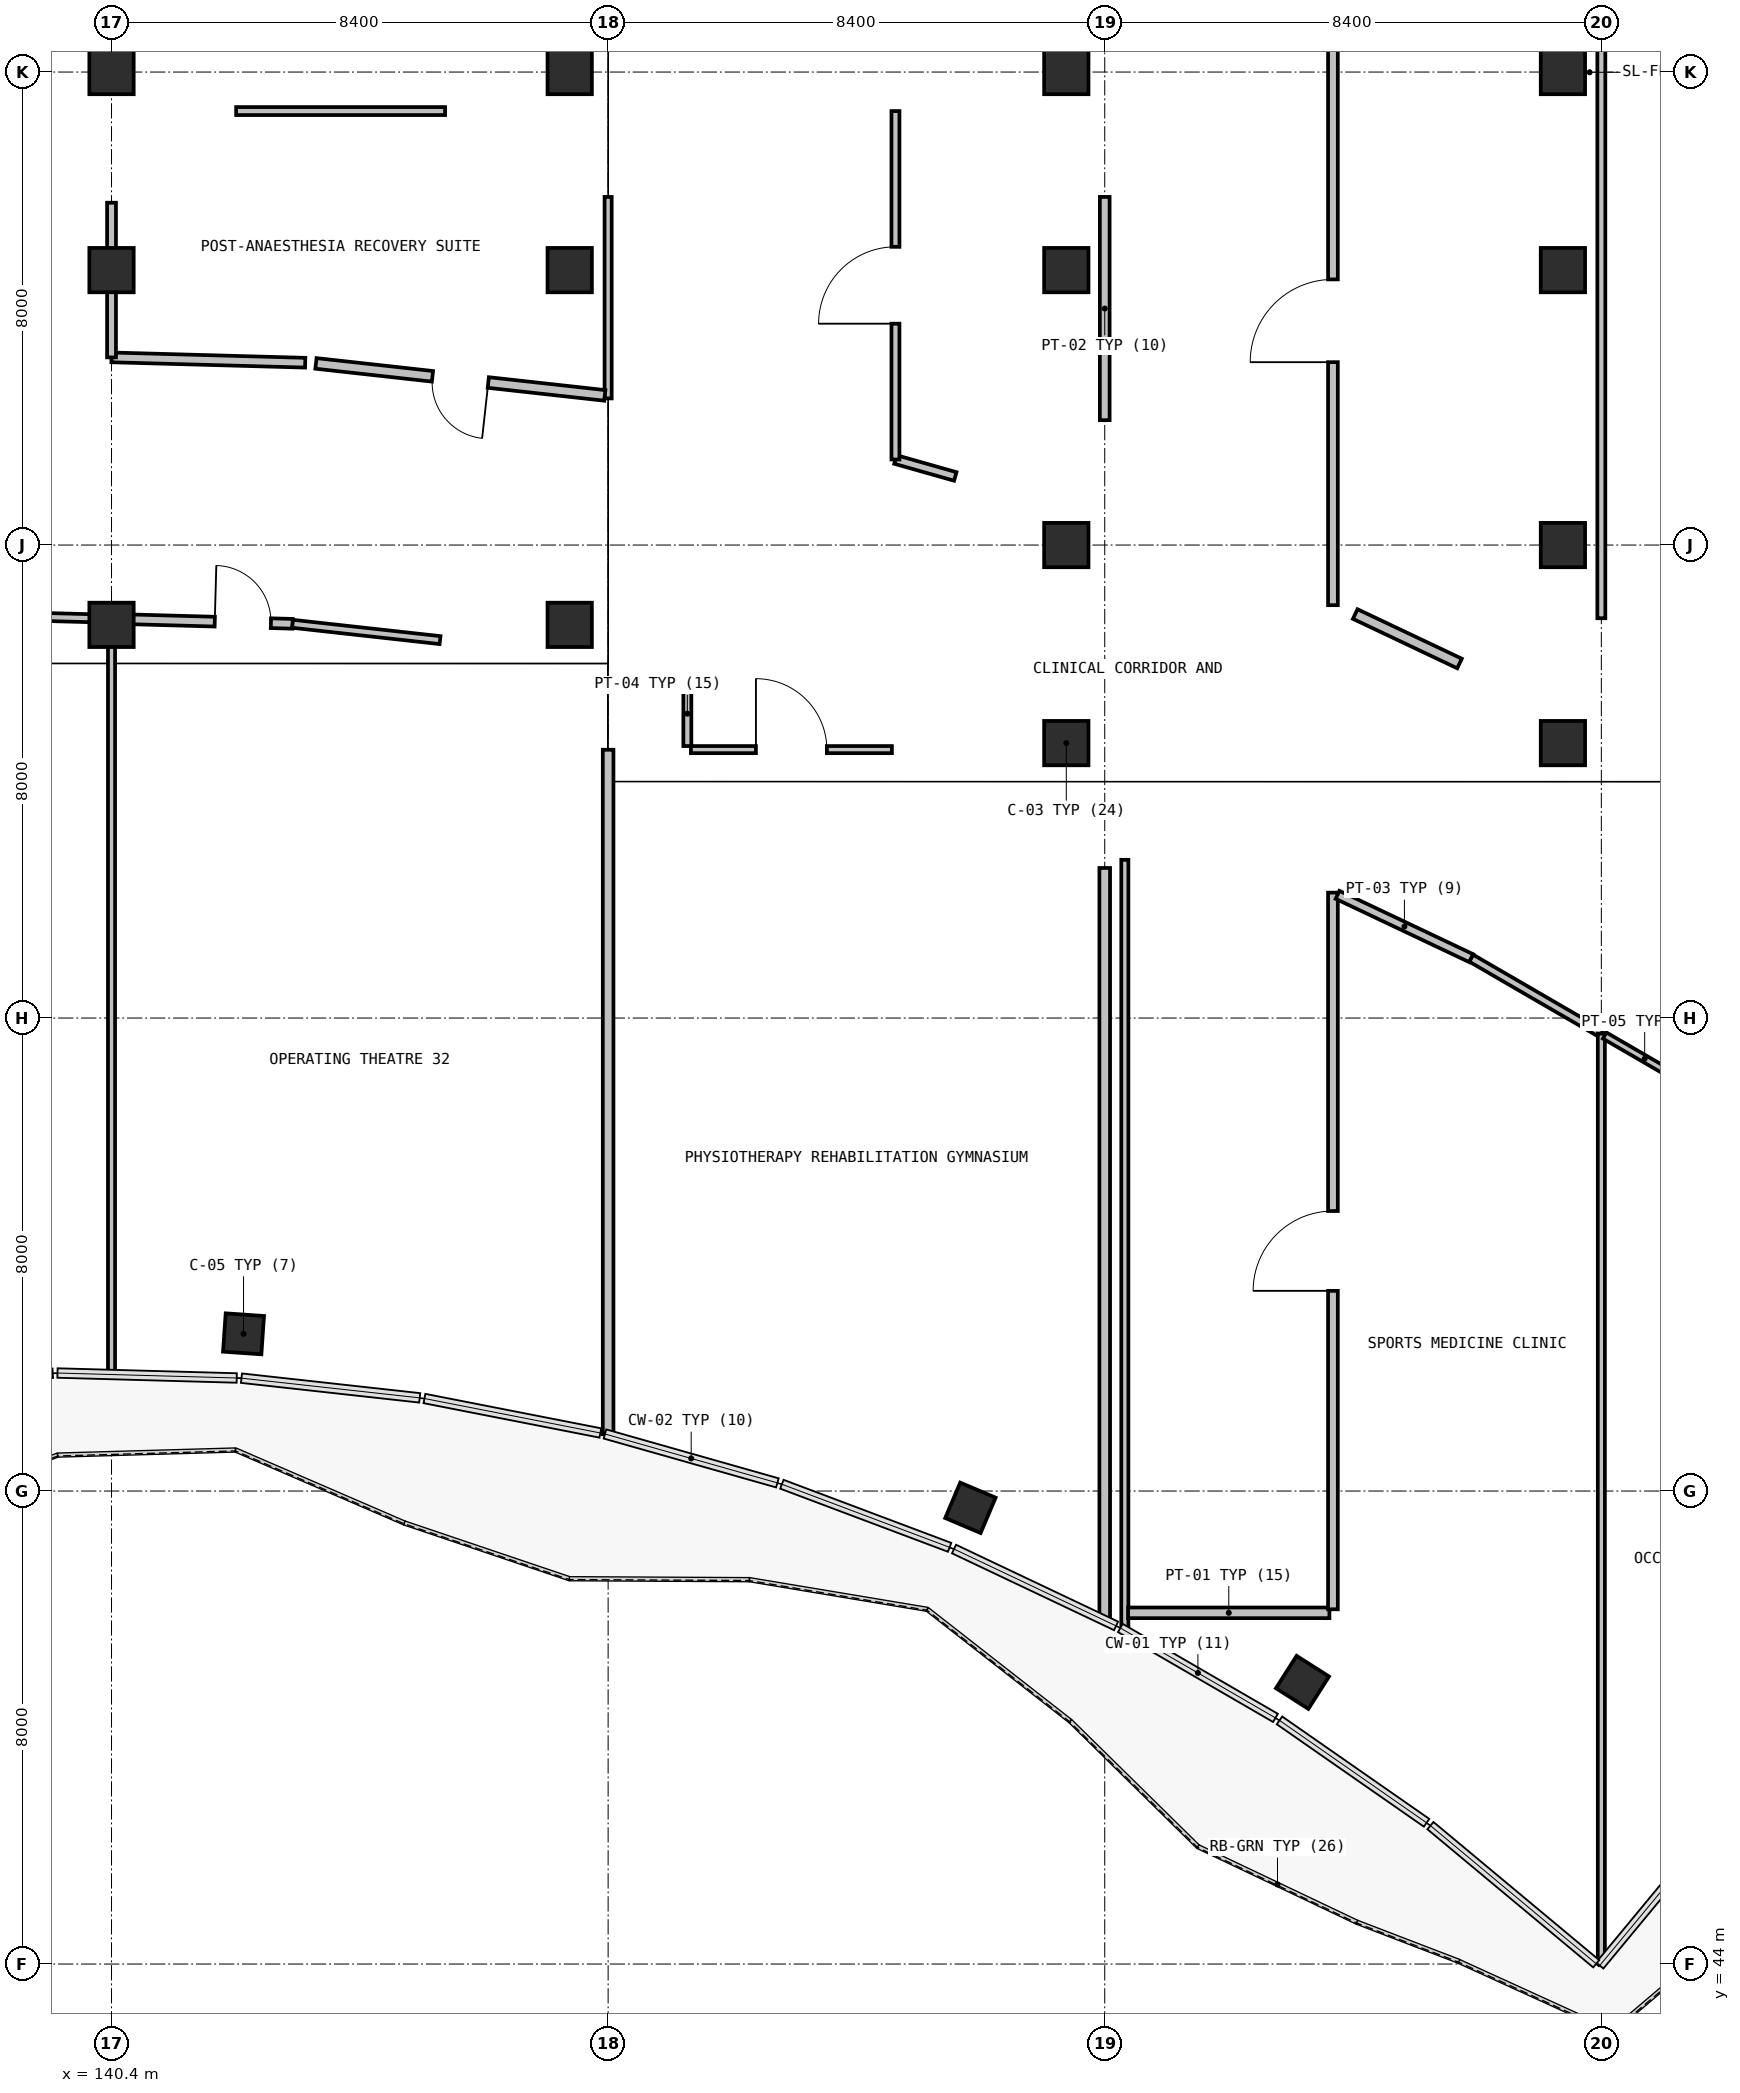
"""IFC4 building model, lengths in metres.
Left out: names, types, materials, properties, quantities, classifications, styles, units other than length and angle.
Written with IfcOpenShell. Run it as: python <this file> out.ifc"""

import sys

from ifc_helpers import new_model, si_unit, direction, frame, frame_2d, origin, origin_2d, place, context, subcontext, project, spatial, rectangle, extrude, element, fill, save


model = new_model("IFC4")
c1 = context("Model", 3, precision=1e-05, world=origin(), true_north=direction((0.0, 1.0)))
c2 = subcontext(c1, "Body", "Model", "MODEL_VIEW")
j1 = project(units=[si_unit("LENGTHUNIT", "METRE"), si_unit("PLANEANGLEUNIT", "RADIAN")], contexts=[c1])
p1 = place(None, origin())
s1 = spatial("IfcSite", under=j1, at=p1, CompositionType="ELEMENT")
p2 = place(p1, origin())
s2 = spatial("IfcBuilding", under=s1, at=p2, CompositionType="ELEMENT")
p3 = place(p2, frame((0.0, 0.0, 10.2)))
s3 = spatial("IfcBuildingStorey", under=s2, at=p3, CompositionType="ELEMENT", Elevation=10.2)
for number, where, z_axis, x_axis in (
    (1, (140.4, 66.65, 0.0), (0.0, 0.0, 1.0), (1.0, 0.0, 0.0)),
    (2, (140.4, 72.65, 0.0), (0.0, 0.0, 1.0), (1.0, 0.0, 0.0)),
    (3, (140.4, 76.0, 0.0), (0.0, 0.0, 1.0), (1.0, 0.0, 0.0)),
    (4, (148.15, 66.65, 0.0), (0.0, 0.0, 1.0), (1.0, 0.0, 0.0)),
    (5, (148.15, 72.65, 0.0), (0.0, 0.0, 1.0), (1.0, 0.0, 0.0)),
    (6, (148.15, 76.0, 0.0), (0.0, 0.0, 1.0), (1.0, 0.0, 0.0)),
    (7, (156.55, 64.65, 0.0), (0.0, 0.0, 1.0), (1.0, 0.0, 0.0)),
    (8, (156.55, 68.0, 0.0), (0.0, 0.0, 1.0), (1.0, 0.0, 0.0)),
    (9, (156.55, 72.65, 0.0), (0.0, 0.0, 1.0), (1.0, 0.0, 0.0)),
    (10, (156.55, 76.0, 0.0), (0.0, 0.0, 1.0), (1.0, 0.0, 0.0)),
    (11, (164.95, 64.65, 0.0), (0.0, 0.0, 1.0), (1.0, 0.0, 0.0)),
    (12, (164.95, 68.0, 0.0), (0.0, 0.0, 1.0), (1.0, 0.0, 0.0)),
    (13, (164.95, 72.65, 0.0), (0.0, 0.0, 1.0), (1.0, 0.0, 0.0)),
    (14, (164.95, 76.0, 0.0), (0.0, 0.0, 1.0), (1.0, 0.0, 0.0)),
):
    element("IfcColumn", number, at=place(p3, frame(where, z_axis=z_axis, x_axis=x_axis)), inside=s3, PredefinedType="COLUMN", context=c2, shape_type="SweptSolid", body=[
        extrude(rectangle(XDim=0.75, YDim=0.75, at=origin_2d()), origin(), (0.0, 0.0, 1.0), 4.8),
    ])
for number, where, z_axis, x_axis in (
    (15, (142.633, 54.659, 0.0), (0.0, 0.0, 1.0), (0.069, 0.998, 0.0)),
    (16, (154.928, 51.716, 0.0), (0.0, 0.0, 1.0), (0.39, 0.921, 0.0)),
    (17, (160.545, 48.764, 0.0), (0.0, 0.0, 1.0), (0.537, 0.844, 0.0)),
):
    element("IfcColumn", number, at=place(p3, frame(where, z_axis=z_axis, x_axis=x_axis)), inside=s3, PredefinedType="COLUMN", context=c2, shape_type="SweptSolid", body=[
        extrude(rectangle(XDim=0.65, YDim=0.65, at=origin_2d()), origin(), (0.0, 0.0, 1.0), 4.8),
    ])
p4 = place(p3, frame((139.29, 66.783, 0.0), z_axis=(0.0, 0.0, 1.0), x_axis=(0.999634166902, -0.027046854934, 0.0)))
e18 = element("IfcWall", 18, at=p4, inside=s3, PredefinedType="PARTITIONING", context=c2, shape_type="SweptSolid", body=[
    extrude(rectangle(XDim=1.11, YDim=0.135, at=frame_2d((0.555, 0.0))), origin(), (0.0, 0.0, 1.0), 3.71),
])
p5 = place(p3, frame((140.4, 66.753, 0.0), z_axis=(0.0, 0.0, 1.0), x_axis=(0.0, -1.0, 0.0)))
e19 = element("IfcWall", 19, at=p5, inside=s3, PredefinedType="PARTITIONING", context=c2, shape_type="SweptSolid", body=[
    extrude(rectangle(XDim=12.771, YDim=0.12, at=frame_2d((6.385, 0.0))), origin(), (0.0, 0.0, 1.0), 4.46),
])
p6 = place(p3, frame((140.456, 66.751, 0.0), z_axis=(0.0, 0.0, 1.0), x_axis=(0.999619161953, -0.027595852149, 0.0)))
e20 = element("IfcWall", 20, at=p6, inside=s3, PredefinedType="PARTITIONING", context=c2, shape_type="SweptSolid", body=[
    extrude(rectangle(XDim=3.008, YDim=0.165, at=frame_2d((1.504, 0.0))), origin(), (0.0, 0.0, 1.0), 3.71),
])
p7 = place(p6, frame((1.691, 0.0, 0.0)))
e21 = element("IfcOpeningElement", 21, at=p7, cuts=e20, PredefinedType="OPENING", context=c2, shape_type="SweptSolid", body=[
    extrude(rectangle(XDim=0.95, YDim=2.1, at=frame_2d((0.475, 1.05))), frame((0.0, 0.093, 0.0), z_axis=(0.0, -1.0, 0.0), x_axis=(1.0, 0.0, 0.0)), (0.0, 0.0, 1.0), 0.185),
])
p8 = place(p3, frame((143.463, 66.668, 0.0), z_axis=(0.0, 0.0, 1.0), x_axis=(0.993938191899, -0.109940305095, 0.0)))
e22 = element("IfcWall", 22, at=p8, inside=s3, PredefinedType="PARTITIONING", context=c2, shape_type="SweptSolid", body=[
    extrude(rectangle(XDim=2.509, YDim=0.135, at=frame_2d((1.255, 0.0))), origin(), (0.0, 0.0, 1.0), 3.71),
])
p9 = place(p3, frame((148.8, 64.538, 0.0), z_axis=(0.0, 0.0, 1.0), x_axis=(0.0, -1.0, 0.0)))
e23 = element("IfcWall", 23, at=p9, inside=s3, PredefinedType="PARTITIONING", context=c2, shape_type="SweptSolid", body=[
    extrude(rectangle(XDim=11.577, YDim=0.18, at=frame_2d((5.789, 0.0))), origin(), (0.0, 0.0, 1.0), 4.46),
])
p10 = place(p3, frame((142.508, 75.34, 0.0), z_axis=(0.0, 0.0, 1.0), x_axis=(1.0, 0.0, 0.0)))
e24 = element("IfcWall", 24, at=p10, inside=s3, PredefinedType="PARTITIONING", context=c2, shape_type="SweptSolid", body=[
    extrude(rectangle(XDim=3.534, YDim=0.135, at=frame_2d((1.767, 0.0))), origin(), (0.0, 0.0, 1.0), 4.46),
])
p11 = place(p3, frame((148.8, 73.888, 0.0), z_axis=(0.0, 0.0, 1.0), x_axis=(0.0, -1.0, 0.0)))
e25 = element("IfcWall", 25, at=p11, inside=s3, PredefinedType="PARTITIONING", context=c2, shape_type="SweptSolid", body=[
    extrude(rectangle(XDim=3.408, YDim=0.12, at=frame_2d((1.704, 0.0))), origin(), (0.0, 0.0, 1.0), 4.46),
])
p12 = place(p3, frame((148.744, 70.531, 0.0), z_axis=(0.0, 0.0, 1.0), x_axis=(-0.993925453939, 0.110055404284, 0.0)))
e26 = element("IfcWall", 26, at=p12, inside=s3, PredefinedType="PARTITIONING", context=c2, shape_type="SweptSolid", body=[
    extrude(rectangle(XDim=4.916, YDim=0.18, at=frame_2d((2.458, 0.0))), origin(), (0.0, 0.0, 1.0), 4.46),
])
p13 = place(p12, frame((1.983, 0.0, 0.0)))
e27 = element("IfcOpeningElement", 27, at=p13, cuts=e26, PredefinedType="OPENING", context=c2, shape_type="SweptSolid", body=[
    extrude(rectangle(XDim=0.95, YDim=2.1, at=frame_2d((0.475, 1.05))), frame((0.0, 0.1, 0.0), z_axis=(0.0, -1.0, 0.0), x_axis=(1.0, 0.0, 0.0)), (0.0, 0.0, 1.0), 0.2),
])
p14 = place(p3, frame((143.676, 71.084, 0.0), z_axis=(0.0, 0.0, 1.0), x_axis=(-0.999622135389, 0.02748793263, 0.0)))
e28 = element("IfcWall", 28, at=p14, inside=s3, PredefinedType="PARTITIONING", context=c2, shape_type="SweptSolid", body=[
    extrude(rectangle(XDim=3.277, YDim=0.165, at=frame_2d((1.639, 0.0))), origin(), (0.0, 0.0, 1.0), 4.46),
])
p15 = place(p3, frame((140.4, 71.174, 0.0), z_axis=(0.0, 0.0, 1.0), x_axis=(0.0, 1.0, 0.0)))
e29 = element("IfcWall", 29, at=p15, inside=s3, PredefinedType="PARTITIONING", context=c2, shape_type="SweptSolid", body=[
    extrude(rectangle(XDim=2.616, YDim=0.15, at=frame_2d((1.308, 0.0))), origin(), (0.0, 0.0, 1.0), 3.81),
])
p16 = place(p3, frame((150.14, 65.695, 0.0), z_axis=(0.0, 0.0, 1.0), x_axis=(0.0, -1.0, 0.0)))
e30 = element("IfcWall", 30, at=p16, inside=s3, PredefinedType="PARTITIONING", context=c2, shape_type="SweptSolid", body=[
    extrude(rectangle(XDim=1.095, YDim=0.135, at=frame_2d((0.547, 0.0))), origin(), (0.0, 0.0, 1.0), 4.46),
])
p17 = place(p3, frame((150.2, 64.54, 0.0), z_axis=(0.0, 0.0, 1.0), x_axis=(1.0, 0.0, 0.0)))
e31 = element("IfcWall", 31, at=p17, inside=s3, PredefinedType="PARTITIONING", context=c2, shape_type="SweptSolid", body=[
    extrude(rectangle(XDim=3.4, YDim=0.12, at=frame_2d((1.7, 0.0))), origin(), (0.0, 0.0, 1.0), 4.46),
])
p18 = place(p17, frame((1.1, 0.0, 0.0)))
e32 = element("IfcOpeningElement", 32, at=p18, cuts=e31, PredefinedType="OPENING", context=c2, shape_type="SweptSolid", body=[
    extrude(rectangle(XDim=1.2, YDim=2.15, at=frame_2d((0.6, 1.075))), frame((0.0, 0.07, 0.0), z_axis=(0.0, -1.0, 0.0), x_axis=(1.0, 0.0, 0.0)), (0.0, 0.0, 1.0), 0.14),
])
p19 = place(p3, frame((157.2, 62.538, 0.0), z_axis=(0.0, 0.0, 1.0), x_axis=(0.0, -1.0, 0.0)))
e33 = element("IfcWall", 33, at=p19, inside=s3, PredefinedType="PARTITIONING", context=c2, shape_type="SweptSolid", body=[
    extrude(rectangle(XDim=12.715, YDim=0.18, at=frame_2d((6.357, 0.0))), origin(), (0.0, 0.0, 1.0), 4.46),
])
p20 = place(p3, frame((157.2, 73.888, 0.0), z_axis=(0.0, 0.0, 1.0), x_axis=(0.0, -1.0, 0.0)))
e34 = element("IfcWall", 34, at=p20, inside=s3, PredefinedType="PARTITIONING", context=c2, shape_type="SweptSolid", body=[
    extrude(rectangle(XDim=3.776, YDim=0.165, at=frame_2d((1.888, 0.0))), origin(), (0.0, 0.0, 1.0), 4.46),
])
p21 = place(p3, frame((154.672, 69.16, 0.0), z_axis=(0.0, 0.0, 1.0), x_axis=(-0.962047568244, 0.272881799386, 0.0)))
e35 = element("IfcWall", 35, at=p21, inside=s3, PredefinedType="PARTITIONING", context=c2, shape_type="SweptSolid", body=[
    extrude(rectangle(XDim=1.052, YDim=0.15, at=frame_2d((0.526, 0.0))), origin(), (0.0, 0.0, 1.0), 4.46),
])
p22 = place(p3, frame((153.66, 69.447, 0.0), z_axis=(0.0, 0.0, 1.0), x_axis=(0.0, 1.0, 0.0)))
e36 = element("IfcWall", 36, at=p22, inside=s3, PredefinedType="PARTITIONING", context=c2, shape_type="SweptSolid", body=[
    extrude(rectangle(XDim=5.893, YDim=0.135, at=frame_2d((2.947, 0.0))), origin(), (0.0, 0.0, 1.0), 4.46),
])
p23 = place(p22, frame((2.297, 0.0, 0.0)))
e37 = element("IfcOpeningElement", 37, at=p23, cuts=e36, PredefinedType="OPENING", context=c2, shape_type="SweptSolid", body=[
    extrude(rectangle(XDim=1.3, YDim=2.15, at=frame_2d((0.65, 1.075))), frame((0.0, 0.077, 0.0), z_axis=(0.0, -1.0, 0.0), x_axis=(1.0, 0.0, 0.0)), (0.0, 0.0, 1.0), 0.155),
])
p24 = place(p3, frame((157.54, 62.676, 0.0), z_axis=(0.0, 0.0, 1.0), x_axis=(0.0, -1.0, 0.0)))
e38 = element("IfcWall", 38, at=p24, inside=s3, PredefinedType="PARTITIONING", context=c2, shape_type="SweptSolid", body=[
    extrude(rectangle(XDim=13.023, YDim=0.12, at=frame_2d((6.511, 0.0))), origin(), (0.0, 0.0, 1.0), 4.46),
])
p25 = place(p3, frame((157.596, 49.94, 0.0), z_axis=(0.0, 0.0, 1.0), x_axis=(1.0, 0.0, 0.0)))
e39 = element("IfcWall", 39, at=p25, inside=s3, PredefinedType="PARTITIONING", context=c2, shape_type="SweptSolid", body=[
    extrude(rectangle(XDim=3.404, YDim=0.18, at=frame_2d((1.702, 0.0))), origin(), (0.0, 0.0, 1.0), 4.46),
])
p26 = place(p3, frame((161.06, 50.0, 0.0), z_axis=(0.0, 0.0, 1.0), x_axis=(0.0, 1.0, 0.0)))
e40 = element("IfcWall", 40, at=p26, inside=s3, PredefinedType="PARTITIONING", context=c2, shape_type="SweptSolid", body=[
    extrude(rectangle(XDim=12.121, YDim=0.165, at=frame_2d((6.061, 0.0))), origin(), (0.0, 0.0, 1.0), 4.46),
])
p27 = place(p26, frame((5.386, 0.0, 0.0)))
e41 = element("IfcOpeningElement", 41, at=p27, cuts=e40, PredefinedType="OPENING", context=c2, shape_type="SweptSolid", body=[
    extrude(rectangle(XDim=1.35, YDim=2.15, at=frame_2d((0.675, 1.075))), frame((0.0, 0.093, 0.0), z_axis=(0.0, -1.0, 0.0), x_axis=(1.0, 0.0, 0.0)), (0.0, 0.0, 1.0), 0.185),
])
p28 = place(p3, frame((161.138, 62.084, 0.0), z_axis=(0.0, 0.0, 1.0), x_axis=(0.903650436863, -0.42827081147, 0.0)))
e42 = element("IfcWall", 42, at=p28, inside=s3, PredefinedType="PARTITIONING", context=c2, shape_type="SweptSolid", body=[
    extrude(rectangle(XDim=2.503, YDim=0.15, at=frame_2d((1.251, 0.0))), origin(), (0.0, 0.0, 1.0), 4.46),
])
p29 = place(p3, frame((163.4, 61.012, 0.0), z_axis=(0.0, 0.0, 1.0), x_axis=(0.865071180383, -0.501649133231, 0.0)))
e43 = element("IfcWall", 43, at=p29, inside=s3, PredefinedType="PARTITIONING", context=c2, shape_type="SweptSolid", body=[
    extrude(rectangle(XDim=2.543, YDim=0.135, at=frame_2d((1.272, 0.0))), origin(), (0.0, 0.0, 1.0), 4.46),
])
p30 = place(p3, frame((165.6, 59.736, 0.0), z_axis=(0.0, 0.0, 1.0), x_axis=(0.0, -1.0, 0.0)))
e44 = element("IfcWall", 44, at=p30, inside=s3, PredefinedType="PARTITIONING", context=c2, shape_type="SweptSolid", body=[
    extrude(rectangle(XDim=15.71, YDim=0.12, at=frame_2d((7.855, 0.0))), origin(), (0.0, 0.0, 1.0), 4.46),
])
p31 = place(p3, frame((163.201, 65.997, 0.0), z_axis=(0.0, 0.0, 1.0), x_axis=(-0.903658874167, 0.428253008325, 0.0)))
e45 = element("IfcWall", 45, at=p31, inside=s3, PredefinedType="PARTITIONING", context=c2, shape_type="SweptSolid", body=[
    extrude(rectangle(XDim=1.952, YDim=0.18, at=frame_2d((0.976, 0.0))), origin(), (0.0, 0.0, 1.0), 4.46),
])
p32 = place(p3, frame((161.06, 66.983, 0.0), z_axis=(0.0, 0.0, 1.0), x_axis=(0.0, 1.0, 0.0)))
e46 = element("IfcWall", 46, at=p32, inside=s3, PredefinedType="PARTITIONING", context=c2, shape_type="SweptSolid", body=[
    extrude(rectangle(XDim=9.62, YDim=0.165, at=frame_2d((4.81, 0.0))), origin(), (0.0, 0.0, 1.0), 4.46),
])
p33 = place(p32, frame((4.11, 0.0, 0.0)))
e47 = element("IfcOpeningElement", 47, at=p33, cuts=e46, PredefinedType="OPENING", context=c2, shape_type="SweptSolid", body=[
    extrude(rectangle(XDim=1.4, YDim=2.15, at=frame_2d((0.7, 1.075))), frame((0.0, 0.093, 0.0), z_axis=(0.0, -1.0, 0.0), x_axis=(1.0, 0.0, 0.0)), (0.0, 0.0, 1.0), 0.185),
])
p34 = place(p3, frame((165.6, 77.529, 0.0), z_axis=(0.0, 0.0, 1.0), x_axis=(0.0, -1.0, 0.0)))
e48 = element("IfcWall", 48, at=p34, inside=s3, PredefinedType="PARTITIONING", context=c2, shape_type="SweptSolid", body=[
    extrude(rectangle(XDim=10.767, YDim=0.135, at=frame_2d((5.384, 0.0))), origin(), (0.0, 0.0, 1.0), 4.46),
])
p35 = place(p3, frame((165.656, 59.704, 0.0), z_axis=(0.0, 0.0, 1.0), x_axis=(0.864806420331, -0.502105422551, 0.0)))
e49 = element("IfcWall", 49, at=p35, inside=s3, PredefinedType="PARTITIONING", context=c2, shape_type="SweptSolid", body=[
    extrude(rectangle(XDim=1.566, YDim=0.12, at=frame_2d((0.783, 0.0))), origin(), (0.0, 0.0, 1.0), 4.46),
])
p36 = place(p7, origin())
e50 = element("IfcDoor", 50, at=p36, inside=s3, OperationType="SINGLE_SWING_LEFT", PredefinedType="DOOR", context=c2, shape_type="SweptSolid", body=[
    extrude(rectangle(XDim=0.95, YDim=2.1, at=frame_2d((0.475, 1.05))), frame((0.0, 0.025, 0.0), z_axis=(0.0, -1.0, 0.0), x_axis=(1.0, 0.0, 0.0)), (0.0, 0.0, 1.0), 0.05),
])
fill(e21, e50)
p37 = place(p13, origin())
e51 = element("IfcDoor", 51, at=p37, inside=s3, OperationType="SINGLE_SWING_RIGHT", PredefinedType="DOOR", context=c2, shape_type="SweptSolid", body=[
    extrude(rectangle(XDim=0.95, YDim=2.1, at=frame_2d((0.475, 1.05))), frame((0.0, 0.025, 0.0), z_axis=(0.0, -1.0, 0.0), x_axis=(1.0, 0.0, 0.0)), (0.0, 0.0, 1.0), 0.05),
])
fill(e27, e51)
p38 = place(p18, origin())
e52 = element("IfcDoor", 52, at=p38, inside=s3, OperationType="SINGLE_SWING_LEFT", PredefinedType="DOOR", context=c2, shape_type="SweptSolid", body=[
    extrude(rectangle(XDim=1.2, YDim=2.15, at=frame_2d((0.6, 1.075))), frame((0.0, 0.025, 0.0), z_axis=(0.0, -1.0, 0.0), x_axis=(1.0, 0.0, 0.0)), (0.0, 0.0, 1.0), 0.05),
])
fill(e32, e52)
p39 = place(p23, origin())
e53 = element("IfcDoor", 53, at=p39, inside=s3, OperationType="SINGLE_SWING_RIGHT", PredefinedType="DOOR", context=c2, shape_type="SweptSolid", body=[
    extrude(rectangle(XDim=1.3, YDim=2.15, at=frame_2d((0.65, 1.075))), frame((0.0, 0.025, 0.0), z_axis=(0.0, -1.0, 0.0), x_axis=(1.0, 0.0, 0.0)), (0.0, 0.0, 1.0), 0.05),
])
fill(e37, e53)
p40 = place(p27, origin())
e54 = element("IfcDoor", 54, at=p40, inside=s3, OperationType="SINGLE_SWING_LEFT", PredefinedType="DOOR", context=c2, shape_type="SweptSolid", body=[
    extrude(rectangle(XDim=1.35, YDim=2.15, at=frame_2d((0.675, 1.075))), frame((0.0, 0.025, 0.0), z_axis=(0.0, -1.0, 0.0), x_axis=(1.0, 0.0, 0.0)), (0.0, 0.0, 1.0), 0.05),
])
fill(e41, e54)
p41 = place(p33, origin())
e55 = element("IfcDoor", 55, at=p41, inside=s3, OperationType="SINGLE_SWING_RIGHT", PredefinedType="DOOR", context=c2, shape_type="SweptSolid", body=[
    extrude(rectangle(XDim=1.4, YDim=2.15, at=frame_2d((0.7, 1.075))), frame((0.0, 0.025, 0.0), z_axis=(0.0, -1.0, 0.0), x_axis=(1.0, 0.0, 0.0)), (0.0, 0.0, 1.0), 0.05),
])
fill(e47, e55)
save(model, sys.argv[1])
